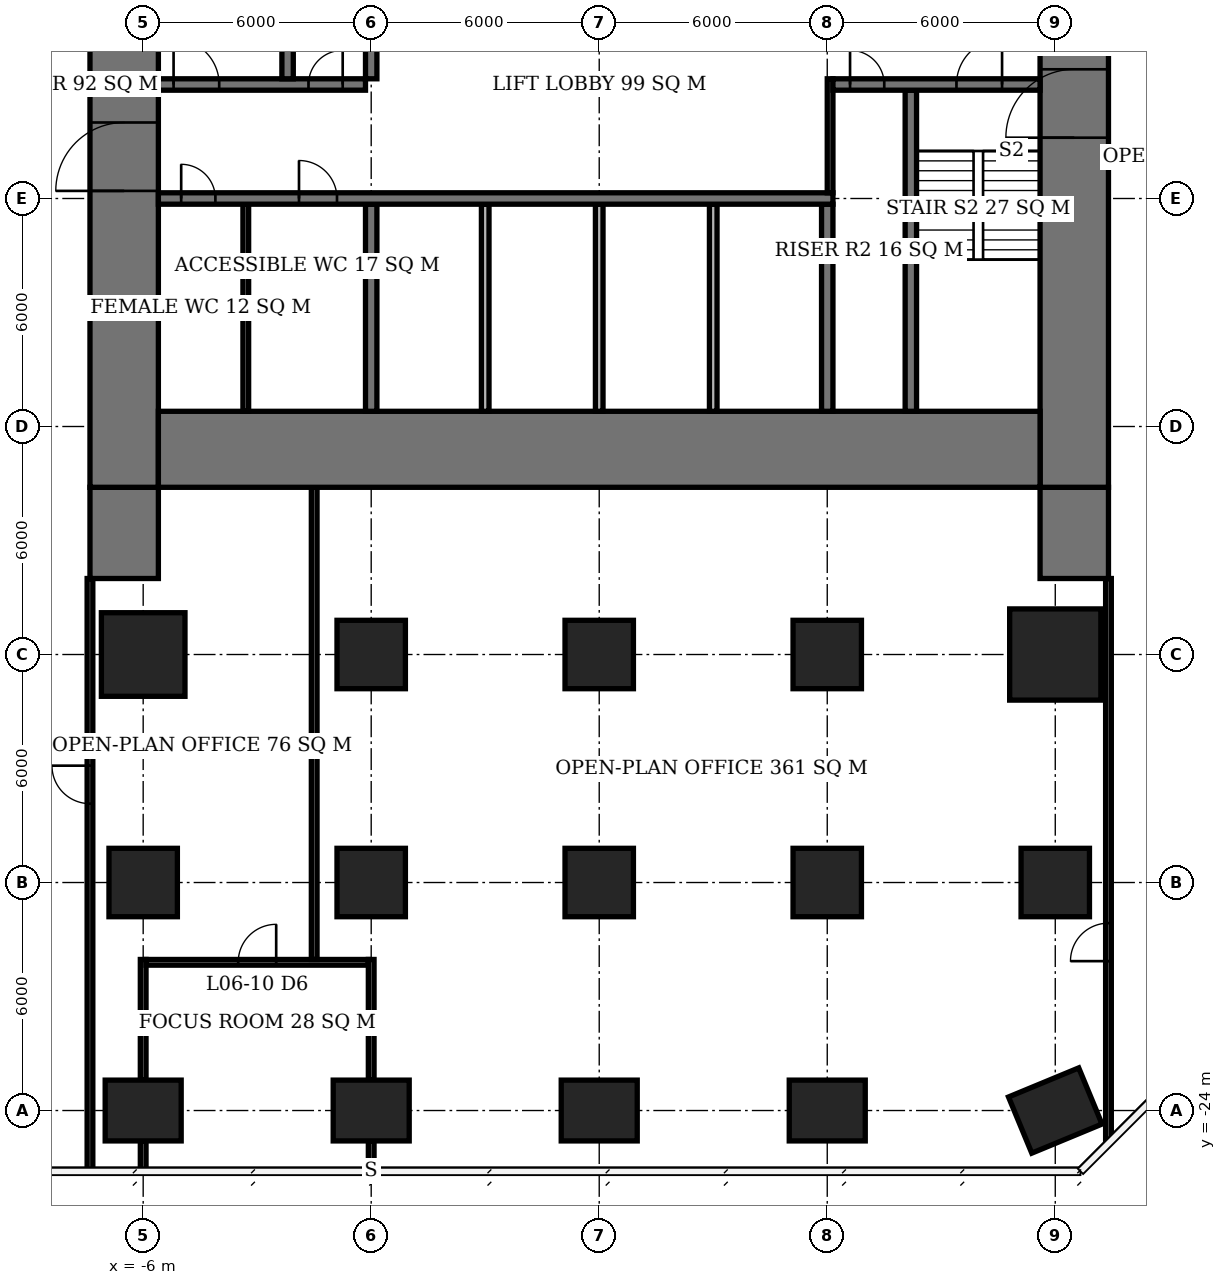
"""IFC4 building model, lengths in metres.
Left out: names, types, materials, properties, quantities, classifications, styles, units other than length and angle.
Written with IfcOpenShell. Run it as: python <this file> out.ifc"""

import sys

from ifc_helpers import new_model, si_unit, direction, frame, frame_2d, origin, origin_2d, place, context, subcontext, project, spatial, rectangle, extrude, element, fill, save


model = new_model("IFC4")
c1 = context("Model", 3, precision=1e-05, world=origin(), true_north=direction((0.0, 1.0)))
c2 = subcontext(c1, "Body", "Model", "MODEL_VIEW")
j1 = project(units=[si_unit("LENGTHUNIT", "METRE"), si_unit("PLANEANGLEUNIT", "RADIAN")], contexts=[c1])
p1 = place(None, origin())
s1 = spatial("IfcSite", under=j1, at=p1, CompositionType="ELEMENT")
p2 = place(p1, origin())
s2 = spatial("IfcBuilding", under=s1, at=p2, CompositionType="ELEMENT")
p3 = place(p2, frame((0.0, 0.0, 29.9)))
s3 = spatial("IfcBuildingStorey", under=s2, at=p3, CompositionType="ELEMENT", Elevation=29.9)
p4 = place(p3, frame((-6.0, -24.0, 0.0), z_axis=(0.0, 0.0, 1.0), x_axis=(1.0, 0.0, 0.0)))
e1 = element("IfcColumn", 1, at=p4, inside=s3, PredefinedType="COLUMN", context=c2, shape_type="SweptSolid", body=[
    extrude(rectangle(XDim=2.0, YDim=1.6, at=origin_2d()), origin(), (0.0, 0.0, 1.0), 3.9),
])
p5 = place(p3, frame((-6.0, -18.0, 0.0), z_axis=(0.0, 0.0, 1.0), x_axis=(1.0, 0.0, 0.0)))
e2 = element("IfcColumn", 2, at=p5, inside=s3, PredefinedType="COLUMN", context=c2, shape_type="SweptSolid", body=[
    extrude(rectangle(XDim=1.8, YDim=1.8, at=origin_2d()), origin(), (0.0, 0.0, 1.0), 3.9),
])
p6 = place(p3, frame((-6.0, -12.0, 0.0), z_axis=(0.0, 0.0, 1.0), x_axis=(1.0, 0.0, 0.0)))
e3 = element("IfcColumn", 3, at=p6, inside=s3, PredefinedType="COLUMN", context=c2, shape_type="SweptSolid", body=[
    extrude(rectangle(XDim=2.2, YDim=2.2, at=origin_2d()), origin(), (0.0, 0.0, 1.0), 3.9),
])
p7 = place(p3, frame((0.0, -24.0, 0.0), z_axis=(0.0, 0.0, 1.0), x_axis=(1.0, 0.0, 0.0)))
e4 = element("IfcColumn", 4, at=p7, inside=s3, PredefinedType="COLUMN", context=c2, shape_type="SweptSolid", body=[
    extrude(rectangle(XDim=2.0, YDim=1.6, at=origin_2d()), origin(), (0.0, 0.0, 1.0), 3.9),
])
for number, where, z_axis, x_axis in (
    (5, (0.0, -18.0, 0.0), (0.0, 0.0, 1.0), (1.0, 0.0, 0.0)),
    (6, (0.0, -12.0, 0.0), (0.0, 0.0, 1.0), (1.0, 0.0, 0.0)),
):
    element("IfcColumn", number, at=place(p3, frame(where, z_axis=z_axis, x_axis=x_axis)), inside=s3, PredefinedType="COLUMN", context=c2, shape_type="SweptSolid", body=[
        extrude(rectangle(XDim=1.8, YDim=1.8, at=origin_2d()), origin(), (0.0, 0.0, 1.0), 3.9),
    ])
p8 = place(p3, frame((6.0, -24.0, 0.0), z_axis=(0.0, 0.0, 1.0), x_axis=(1.0, 0.0, 0.0)))
e7 = element("IfcColumn", 7, at=p8, inside=s3, PredefinedType="COLUMN", context=c2, shape_type="SweptSolid", body=[
    extrude(rectangle(XDim=2.0, YDim=1.6, at=origin_2d()), origin(), (0.0, 0.0, 1.0), 3.9),
])
for number, where, z_axis, x_axis in (
    (8, (6.0, -18.0, 0.0), (0.0, 0.0, 1.0), (1.0, 0.0, 0.0)),
    (9, (6.0, -12.0, 0.0), (0.0, 0.0, 1.0), (1.0, 0.0, 0.0)),
):
    element("IfcColumn", number, at=place(p3, frame(where, z_axis=z_axis, x_axis=x_axis)), inside=s3, PredefinedType="COLUMN", context=c2, shape_type="SweptSolid", body=[
        extrude(rectangle(XDim=1.8, YDim=1.8, at=origin_2d()), origin(), (0.0, 0.0, 1.0), 3.9),
    ])
p9 = place(p3, frame((12.0, -24.0, 0.0), z_axis=(0.0, 0.0, 1.0), x_axis=(1.0, 0.0, 0.0)))
e10 = element("IfcColumn", 10, at=p9, inside=s3, PredefinedType="COLUMN", context=c2, shape_type="SweptSolid", body=[
    extrude(rectangle(XDim=2.0, YDim=1.6, at=origin_2d()), origin(), (0.0, 0.0, 1.0), 3.9),
])
for number, where, z_axis, x_axis in (
    (11, (12.0, -18.0, 0.0), (0.0, 0.0, 1.0), (1.0, 0.0, 0.0)),
    (12, (12.0, -12.0, 0.0), (0.0, 0.0, 1.0), (1.0, 0.0, 0.0)),
):
    element("IfcColumn", number, at=place(p3, frame(where, z_axis=z_axis, x_axis=x_axis)), inside=s3, PredefinedType="COLUMN", context=c2, shape_type="SweptSolid", body=[
        extrude(rectangle(XDim=1.8, YDim=1.8, at=origin_2d()), origin(), (0.0, 0.0, 1.0), 3.9),
    ])
p10 = place(p3, frame((18.0, -24.0, 0.0), z_axis=(0.0, 0.0, 1.0), x_axis=(-0.923879532511, -0.382683432365, 0.0)))
e13 = element("IfcColumn", 13, at=p10, inside=s3, PredefinedType="COLUMN", context=c2, shape_type="SweptSolid", body=[
    extrude(rectangle(XDim=2.0, YDim=1.6, at=origin_2d()), origin(), (0.0, 0.0, 1.0), 3.9),
])
p11 = place(p3, frame((18.0, -18.0, 0.0), z_axis=(0.0, 0.0, 1.0), x_axis=(1.0, 0.0, 0.0)))
e14 = element("IfcColumn", 14, at=p11, inside=s3, PredefinedType="COLUMN", context=c2, shape_type="SweptSolid", body=[
    extrude(rectangle(XDim=1.8, YDim=1.8, at=origin_2d()), origin(), (0.0, 0.0, 1.0), 3.9),
])
p12 = place(p3, frame((18.0, -12.0, 0.0), z_axis=(0.0, 0.0, 1.0), x_axis=(1.0, 0.0, 0.0)))
e15 = element("IfcColumn", 15, at=p12, inside=s3, PredefinedType="COLUMN", context=c2, shape_type="SweptSolid", body=[
    extrude(rectangle(XDim=2.4, YDim=2.4, at=origin_2d()), origin(), (0.0, 0.0, 1.0), 3.9),
])
p13 = place(p3, frame((-5.6, -6.6, 0.0), z_axis=(0.0, 0.0, 1.0), x_axis=(1.0, 0.0, 0.0)))
e16 = element("IfcWall", 16, at=p13, inside=s3, PredefinedType="SHEAR", context=c2, shape_type="SweptSolid", body=[
    extrude(rectangle(XDim=23.2, YDim=2.0, at=frame_2d((11.6, 0.0))), origin(), (0.0, 0.0, 1.0), 3.9),
])
p14 = place(p3, frame((-6.5, -7.6, 0.0), z_axis=(0.0, 0.0, 1.0), x_axis=(0.0, 1.0, 0.0)))
e17 = element("IfcWall", 17, at=p14, inside=s3, PredefinedType="SHEAR", context=c2, shape_type="SweptSolid", body=[
    extrude(rectangle(XDim=21.2, YDim=1.8, at=frame_2d((10.6, 0.0))), origin(), (0.0, 0.0, 1.0), 3.9),
])
p15 = place(p14, frame((7.8, 0.0, 0.0)))
e18 = element("IfcOpeningElement", 18, at=p15, cuts=e17, PredefinedType="OPENING", context=c2, shape_type="SweptSolid", body=[
    extrude(rectangle(XDim=1.8, YDim=2.4, at=frame_2d((0.9, 1.2))), frame((0.0, 0.91, 0.0), z_axis=(0.0, -1.0, 0.0), x_axis=(1.0, 0.0, 0.0)), (0.0, 0.0, 1.0), 1.82),
])
p16 = place(p3, frame((18.5, -7.6, 0.0), z_axis=(0.0, 0.0, 1.0), x_axis=(0.0, 1.0, 0.0)))
e19 = element("IfcWall", 19, at=p16, inside=s3, PredefinedType="SHEAR", context=c2, shape_type="SweptSolid", body=[
    extrude(rectangle(XDim=21.2, YDim=1.8, at=frame_2d((10.6, 0.0))), origin(), (0.0, 0.0, 1.0), 3.9),
])
p17 = place(p16, frame((9.2, 0.0, 0.0)))
e20 = element("IfcOpeningElement", 20, at=p17, cuts=e19, PredefinedType="OPENING", context=c2, shape_type="SweptSolid", body=[
    extrude(rectangle(XDim=1.8, YDim=2.4, at=frame_2d((0.9, 1.2))), frame((0.0, 0.91, 0.0), z_axis=(0.0, -1.0, 0.0), x_axis=(1.0, 0.0, 0.0)), (0.0, 0.0, 1.0), 1.82),
])
for number, where, z_axis, x_axis in (
    (21, (-6.5, -10.0, 0.0), (0.0, 0.0, 1.0), (0.0, 1.0, 0.0)),
    (22, (18.5, -10.0, 0.0), (0.0, 0.0, 1.0), (0.0, 1.0, 0.0)),
):
    element("IfcWall", number, at=place(p3, frame(where, z_axis=z_axis, x_axis=x_axis)), inside=s3, PredefinedType="SHEAR", context=c2, shape_type="SweptSolid", body=[
        extrude(rectangle(XDim=2.4, YDim=1.8, at=frame_2d((1.2, 0.0))), origin(), (0.0, 0.0, 1.0), 3.9),
    ])
p18 = place(p3, frame((-5.6, 0.0, 0.0), z_axis=(0.0, 0.0, 1.0), x_axis=(1.0, 0.0, 0.0)))
e23 = element("IfcWall", 23, at=p18, inside=s3, PredefinedType="SHEAR", context=c2, shape_type="SweptSolid", body=[
    extrude(rectangle(XDim=17.75, YDim=0.3, at=frame_2d((8.875, 0.0))), origin(), (0.0, 0.0, 1.0), 3.9),
])
p19 = place(p18, frame((0.6, 0.0, 0.0)))
e24 = element("IfcOpeningElement", 24, at=p19, cuts=e23, PredefinedType="OPENING", context=c2, shape_type="SweptSolid", body=[
    extrude(rectangle(XDim=0.9, YDim=2.1, at=frame_2d((0.45, 1.05))), frame((0.0, 0.16, 0.0), z_axis=(0.0, -1.0, 0.0), x_axis=(1.0, 0.0, 0.0)), (0.0, 0.0, 1.0), 0.32),
])
p20 = place(p18, frame((3.7, 0.0, 0.0)))
e25 = element("IfcOpeningElement", 25, at=p20, cuts=e23, PredefinedType="OPENING", context=c2, shape_type="SweptSolid", body=[
    extrude(rectangle(XDim=1.0, YDim=2.1, at=frame_2d((0.5, 1.05))), frame((0.0, 0.16, 0.0), z_axis=(0.0, -1.0, 0.0), x_axis=(1.0, 0.0, 0.0)), (0.0, 0.0, 1.0), 0.32),
])
p21 = place(p3, frame((-5.6, 3.0, 0.0), z_axis=(0.0, 0.0, 1.0), x_axis=(1.0, 0.0, 0.0)))
e26 = element("IfcWall", 26, at=p21, inside=s3, PredefinedType="SHEAR", context=c2, shape_type="SweptSolid", body=[
    extrude(rectangle(XDim=5.45, YDim=0.3, at=frame_2d((2.725, 0.0))), origin(), (0.0, 0.0, 1.0), 3.9),
])
p22 = place(p21, frame((0.4, 0.0, 0.0)))
e27 = element("IfcOpeningElement", 27, at=p22, cuts=e26, PredefinedType="OPENING", context=c2, shape_type="SweptSolid", body=[
    extrude(rectangle(XDim=1.2, YDim=2.1, at=frame_2d((0.6, 1.05))), frame((0.0, 0.16, 0.0), z_axis=(0.0, -1.0, 0.0), x_axis=(1.0, 0.0, 0.0)), (0.0, 0.0, 1.0), 0.32),
])
p23 = place(p21, frame((3.95, 0.0, 0.0)))
e28 = element("IfcOpeningElement", 28, at=p23, cuts=e26, PredefinedType="OPENING", context=c2, shape_type="SweptSolid", body=[
    extrude(rectangle(XDim=0.9, YDim=2.1, at=frame_2d((0.45, 1.05))), frame((0.0, 0.16, 0.0), z_axis=(0.0, -1.0, 0.0), x_axis=(1.0, 0.0, 0.0)), (0.0, 0.0, 1.0), 0.32),
])
p24 = place(p3, frame((12.15, 3.0, 0.0), z_axis=(0.0, 0.0, 1.0), x_axis=(1.0, 0.0, 0.0)))
e29 = element("IfcWall", 29, at=p24, inside=s3, PredefinedType="SHEAR", context=c2, shape_type="SweptSolid", body=[
    extrude(rectangle(XDim=5.45, YDim=0.3, at=frame_2d((2.725, 0.0))), origin(), (0.0, 0.0, 1.0), 3.9),
])
p25 = place(p24, frame((3.25, 0.0, 0.0)))
e30 = element("IfcOpeningElement", 30, at=p25, cuts=e29, PredefinedType="OPENING", context=c2, shape_type="SweptSolid", body=[
    extrude(rectangle(XDim=1.2, YDim=2.1, at=frame_2d((0.6, 1.05))), frame((0.0, 0.16, 0.0), z_axis=(0.0, -1.0, 0.0), x_axis=(1.0, 0.0, 0.0)), (0.0, 0.0, 1.0), 0.32),
])
p26 = place(p24, frame((0.45, 0.0, 0.0)))
e31 = element("IfcOpeningElement", 31, at=p26, cuts=e29, PredefinedType="OPENING", context=c2, shape_type="SweptSolid", body=[
    extrude(rectangle(XDim=0.9, YDim=2.1, at=frame_2d((0.45, 1.05))), frame((0.0, 0.16, 0.0), z_axis=(0.0, -1.0, 0.0), x_axis=(1.0, 0.0, 0.0)), (0.0, 0.0, 1.0), 0.32),
])
p27 = place(p3, frame((0.0, -5.6, 0.0), z_axis=(0.0, 0.0, 1.0), x_axis=(0.0, 1.0, 0.0)))
e32 = element("IfcWall", 32, at=p27, inside=s3, PredefinedType="SHEAR", context=c2, shape_type="SweptSolid", body=[
    extrude(rectangle(XDim=5.45, YDim=0.3, at=frame_2d((2.725, 0.0))), origin(), (0.0, 0.0, 1.0), 3.9),
])
p28 = place(p3, frame((0.0, 3.15, 0.0), z_axis=(0.0, 0.0, 1.0), x_axis=(0.0, 1.0, 0.0)))
e33 = element("IfcWall", 33, at=p28, inside=s3, PredefinedType="SHEAR", context=c2, shape_type="SweptSolid", body=[
    extrude(rectangle(XDim=8.45, YDim=0.3, at=frame_2d((4.225, 0.0))), origin(), (0.0, 0.0, 1.0), 3.9),
])
p29 = place(p3, frame((12.0, -5.6, 0.0), z_axis=(0.0, 0.0, 1.0), x_axis=(0.0, 1.0, 0.0)))
e34 = element("IfcWall", 34, at=p29, inside=s3, PredefinedType="SHEAR", context=c2, shape_type="SweptSolid", body=[
    extrude(rectangle(XDim=5.45, YDim=0.3, at=frame_2d((2.725, 0.0))), origin(), (0.0, 0.0, 1.0), 3.9),
])
for number, where, z_axis, x_axis in (
    (35, (-2.2, 3.15, 0.0), (0.0, 0.0, 1.0), (0.0, 1.0, 0.0)),
    (36, (14.2, -5.6, 0.0), (0.0, 0.0, 1.0), (0.0, 1.0, 0.0)),
):
    element("IfcWall", number, at=place(p3, frame(where, z_axis=z_axis, x_axis=x_axis)), inside=s3, PredefinedType="SHEAR", context=c2, shape_type="SweptSolid", body=[
        extrude(rectangle(XDim=8.45, YDim=0.3, at=frame_2d((4.225, 0.0))), origin(), (0.0, 0.0, 1.0), 3.9),
    ])
for number, where, z_axis, x_axis in (
    (37, (3.0, -5.6, 0.0), (0.0, 0.0, 1.0), (0.0, 1.0, 0.0)),
    (38, (6.0, -5.6, 0.0), (0.0, 0.0, 1.0), (0.0, 1.0, 0.0)),
    (39, (9.0, -5.6, 0.0), (0.0, 0.0, 1.0), (0.0, 1.0, 0.0)),
):
    element("IfcWall", number, at=place(p3, frame(where, z_axis=z_axis, x_axis=x_axis)), inside=s3, PredefinedType="SOLIDWALL", context=c2, shape_type="SweptSolid", body=[
        extrude(rectangle(XDim=5.45, YDim=0.2, at=frame_2d((2.725, 0.0))), origin(), (0.0, 0.0, 1.0), 3.9),
    ])
p30 = place(p3, frame((-3.3, -5.6, 0.0), z_axis=(0.0, 0.0, 1.0), x_axis=(0.0, 1.0, 0.0)))
e40 = element("IfcWall", 40, at=p30, inside=s3, PredefinedType="PLUMBINGWALL", context=c2, shape_type="SweptSolid", body=[
    extrude(rectangle(XDim=5.45, YDim=0.15, at=frame_2d((2.725, 0.0))), origin(), (0.0, 0.0, 1.0), 3.65),
])
p31 = place(p3, frame((-5.925, -20.1, 0.0), z_axis=(0.0, 0.0, 1.0), x_axis=(1.0, 0.0, 0.0)))
e41 = element("IfcWall", 41, at=p31, inside=s3, PredefinedType="PARTITIONING", context=c2, shape_type="SweptSolid", body=[
    extrude(rectangle(XDim=5.85, YDim=0.15, at=frame_2d((2.925, 0.0))), origin(), (0.0, 0.0, 1.0), 3.65),
])
p32 = place(p31, frame((2.425, 0.0, 0.0)))
e42 = element("IfcOpeningElement", 42, at=p32, cuts=e41, PredefinedType="OPENING", context=c2, shape_type="SweptSolid", body=[
    extrude(rectangle(XDim=1.0, YDim=2.1, at=frame_2d((0.5, 1.05))), frame((0.0, 0.085, 0.0), z_axis=(0.0, -1.0, 0.0), x_axis=(1.0, 0.0, 0.0)), (0.0, 0.0, 1.0), 0.17),
])
p33 = place(p3, frame((-6.0, -25.6, 0.0), z_axis=(0.0, 0.0, 1.0), x_axis=(0.0, 1.0, 0.0)))
e43 = element("IfcWall", 43, at=p33, inside=s3, PredefinedType="PARTITIONING", context=c2, shape_type="SweptSolid", body=[
    extrude(rectangle(XDim=0.8, YDim=0.15, at=frame_2d((0.4, 0.0))), origin(), (0.0, 0.0, 1.0), 3.65),
])
p34 = place(p3, frame((-6.0, -23.2, 0.0), z_axis=(0.0, 0.0, 1.0), x_axis=(0.0, 1.0, 0.0)))
e44 = element("IfcWall", 44, at=p34, inside=s3, PredefinedType="PARTITIONING", context=c2, shape_type="SweptSolid", body=[
    extrude(rectangle(XDim=3.175, YDim=0.15, at=frame_2d((1.587, 0.0))), origin(), (0.0, 0.0, 1.0), 3.65),
])
p35 = place(p3, frame((0.0, -25.55, 0.0), z_axis=(0.0, 0.0, 1.0), x_axis=(0.0, 1.0, 0.0)))
e45 = element("IfcWall", 45, at=p35, inside=s3, PredefinedType="PARTITIONING", context=c2, shape_type="SweptSolid", body=[
    extrude(rectangle(XDim=0.75, YDim=0.15, at=frame_2d((0.375, 0.0))), origin(), (0.0, 0.0, 1.0), 3.65),
])
p36 = place(p3, frame((0.0, -23.2, 0.0), z_axis=(0.0, 0.0, 1.0), x_axis=(0.0, 1.0, 0.0)))
e46 = element("IfcWall", 46, at=p36, inside=s3, PredefinedType="PARTITIONING", context=c2, shape_type="SweptSolid", body=[
    extrude(rectangle(XDim=3.175, YDim=0.15, at=frame_2d((1.587, 0.0))), origin(), (0.0, 0.0, 1.0), 3.65),
])
p37 = place(p3, frame((-7.4, -25.6, 0.0), z_axis=(0.0, 0.0, 1.0), x_axis=(0.0, 1.0, 0.0)))
e47 = element("IfcWall", 47, at=p37, inside=s3, PredefinedType="PARTITIONING", context=c2, shape_type="SweptSolid", body=[
    extrude(rectangle(XDim=15.6, YDim=0.15, at=frame_2d((7.8, 0.0))), origin(), (0.0, 0.0, 1.0), 3.65),
])
p38 = place(p37, frame((9.675, 0.0, 0.0)))
e48 = element("IfcOpeningElement", 48, at=p38, cuts=e47, PredefinedType="OPENING", context=c2, shape_type="SweptSolid", body=[
    extrude(rectangle(XDim=1.0, YDim=2.1, at=frame_2d((0.5, 1.05))), frame((0.0, 0.085, 0.0), z_axis=(0.0, -1.0, 0.0), x_axis=(1.0, 0.0, 0.0)), (0.0, 0.0, 1.0), 0.17),
])
p39 = place(p3, frame((-1.5, -20.025, 0.0), z_axis=(0.0, 0.0, 1.0), x_axis=(0.0, 1.0, 0.0)))
e49 = element("IfcWall", 49, at=p39, inside=s3, PredefinedType="PARTITIONING", context=c2, shape_type="SweptSolid", body=[
    extrude(rectangle(XDim=12.425, YDim=0.15, at=frame_2d((6.212, 0.0))), origin(), (0.0, 0.0, 1.0), 3.65),
])
p40 = place(p3, frame((19.4, -24.771, 0.0), z_axis=(0.0, 0.0, 1.0), x_axis=(0.0, 1.0, 0.0)))
e50 = element("IfcWall", 50, at=p40, inside=s3, PredefinedType="PARTITIONING", context=c2, shape_type="SweptSolid", body=[
    extrude(rectangle(XDim=14.771, YDim=0.15, at=frame_2d((7.385, 0.0))), origin(), (0.0, 0.0, 1.0), 3.65),
])
p41 = place(p40, frame((4.702, 0.0, 0.0)))
e51 = element("IfcOpeningElement", 51, at=p41, cuts=e50, PredefinedType="OPENING", context=c2, shape_type="SweptSolid", body=[
    extrude(rectangle(XDim=1.0, YDim=2.1, at=frame_2d((0.5, 1.05))), frame((0.0, 0.085, 0.0), z_axis=(0.0, -1.0, 0.0), x_axis=(1.0, 0.0, 0.0)), (0.0, 0.0, 1.0), 0.17),
])
p42 = place(p3, frame((12.075, 0.15, 0.0), z_axis=(0.0, 0.0, 1.0), x_axis=(0.0, 1.0, 0.0)))
e52 = element("IfcWall", 52, at=p42, inside=s3, PredefinedType="PARTITIONING", context=c2, shape_type="SweptSolid", body=[
    extrude(rectangle(XDim=3.0, YDim=0.15, at=frame_2d((1.5, 0.0))), origin(), (0.0, 0.0, 1.0), 3.65),
])
p43 = place(p15, origin())
e53 = element("IfcDoor", 53, at=p43, inside=s3, OperationType="DOUBLE_DOOR_SINGLE_SWING", PredefinedType="DOOR", context=c2, shape_type="SweptSolid", body=[
    extrude(rectangle(XDim=1.8, YDim=2.4, at=frame_2d((0.9, 1.2))), frame((0.0, 0.025, 0.0), z_axis=(0.0, -1.0, 0.0), x_axis=(1.0, 0.0, 0.0)), (0.0, 0.0, 1.0), 0.05),
])
fill(e18, e53)
p44 = place(p17, origin())
e54 = element("IfcDoor", 54, at=p44, inside=s3, OperationType="DOUBLE_DOOR_SINGLE_SWING", PredefinedType="DOOR", context=c2, shape_type="SweptSolid", body=[
    extrude(rectangle(XDim=1.8, YDim=2.4, at=frame_2d((0.9, 1.2))), frame((0.0, 0.025, 0.0), z_axis=(0.0, -1.0, 0.0), x_axis=(1.0, 0.0, 0.0)), (0.0, 0.0, 1.0), 0.05),
])
fill(e20, e54)
p45 = place(p22, origin())
e55 = element("IfcDoor", 55, at=p45, inside=s3, OperationType="SINGLE_SWING_LEFT", PredefinedType="DOOR", context=c2, shape_type="SweptSolid", body=[
    extrude(rectangle(XDim=1.2, YDim=2.1, at=frame_2d((0.6, 1.05))), frame((0.0, 0.025, 0.0), z_axis=(0.0, -1.0, 0.0), x_axis=(1.0, 0.0, 0.0)), (0.0, 0.0, 1.0), 0.05),
])
fill(e27, e55)
p46 = place(p23, origin())
e56 = element("IfcDoor", 56, at=p46, inside=s3, OperationType="SINGLE_SWING_RIGHT", PredefinedType="DOOR", context=c2, shape_type="SweptSolid", body=[
    extrude(rectangle(XDim=0.9, YDim=2.1, at=frame_2d((0.45, 1.05))), frame((0.0, 0.025, 0.0), z_axis=(0.0, -1.0, 0.0), x_axis=(1.0, 0.0, 0.0)), (0.0, 0.0, 1.0), 0.05),
])
fill(e28, e56)
p47 = place(p25, origin())
e57 = element("IfcDoor", 57, at=p47, inside=s3, OperationType="SINGLE_SWING_RIGHT", PredefinedType="DOOR", context=c2, shape_type="SweptSolid", body=[
    extrude(rectangle(XDim=1.2, YDim=2.1, at=frame_2d((0.6, 1.05))), frame((0.0, 0.025, 0.0), z_axis=(0.0, -1.0, 0.0), x_axis=(1.0, 0.0, 0.0)), (0.0, 0.0, 1.0), 0.05),
])
fill(e30, e57)
p48 = place(p26, origin())
e58 = element("IfcDoor", 58, at=p48, inside=s3, OperationType="SINGLE_SWING_LEFT", PredefinedType="DOOR", context=c2, shape_type="SweptSolid", body=[
    extrude(rectangle(XDim=0.9, YDim=2.1, at=frame_2d((0.45, 1.05))), frame((0.0, 0.025, 0.0), z_axis=(0.0, -1.0, 0.0), x_axis=(1.0, 0.0, 0.0)), (0.0, 0.0, 1.0), 0.05),
])
fill(e31, e58)
p49 = place(p19, origin())
e59 = element("IfcDoor", 59, at=p49, inside=s3, OperationType="SINGLE_SWING_LEFT", PredefinedType="DOOR", context=c2, shape_type="SweptSolid", body=[
    extrude(rectangle(XDim=0.9, YDim=2.1, at=frame_2d((0.45, 1.05))), frame((0.0, 0.025, 0.0), z_axis=(0.0, -1.0, 0.0), x_axis=(1.0, 0.0, 0.0)), (0.0, 0.0, 1.0), 0.05),
])
fill(e24, e59)
p50 = place(p20, origin())
e60 = element("IfcDoor", 60, at=p50, inside=s3, OperationType="SINGLE_SWING_LEFT", PredefinedType="DOOR", context=c2, shape_type="SweptSolid", body=[
    extrude(rectangle(XDim=1.0, YDim=2.1, at=frame_2d((0.5, 1.05))), frame((0.0, 0.025, 0.0), z_axis=(0.0, -1.0, 0.0), x_axis=(1.0, 0.0, 0.0)), (0.0, 0.0, 1.0), 0.05),
])
fill(e25, e60)
p51 = place(p32, origin())
e61 = element("IfcDoor", 61, at=p51, inside=s3, OperationType="SINGLE_SWING_RIGHT", PredefinedType="DOOR", context=c2, shape_type="SweptSolid", body=[
    extrude(rectangle(XDim=1.0, YDim=2.1, at=frame_2d((0.5, 1.05))), frame((0.0, 0.025, 0.0), z_axis=(0.0, -1.0, 0.0), x_axis=(1.0, 0.0, 0.0)), (0.0, 0.0, 1.0), 0.05),
])
fill(e42, e61)
p52 = place(p41, origin())
e62 = element("IfcDoor", 62, at=p52, inside=s3, OperationType="SINGLE_SWING_LEFT", PredefinedType="DOOR", context=c2, shape_type="SweptSolid", body=[
    extrude(rectangle(XDim=1.0, YDim=2.1, at=frame_2d((0.5, 1.05))), frame((0.0, 0.025, 0.0), z_axis=(0.0, -1.0, 0.0), x_axis=(1.0, 0.0, 0.0)), (0.0, 0.0, 1.0), 0.05),
])
fill(e51, e62)
p53 = place(p38, origin())
e63 = element("IfcDoor", 63, at=p53, inside=s3, OperationType="SINGLE_SWING_RIGHT", PredefinedType="DOOR", context=c2, shape_type="SweptSolid", body=[
    extrude(rectangle(XDim=1.0, YDim=2.1, at=frame_2d((0.5, 1.05))), frame((0.0, 0.025, 0.0), z_axis=(0.0, -1.0, 0.0), x_axis=(1.0, 0.0, 0.0)), (0.0, 0.0, 1.0), 0.05),
])
fill(e48, e63)
save(model, sys.argv[1])
